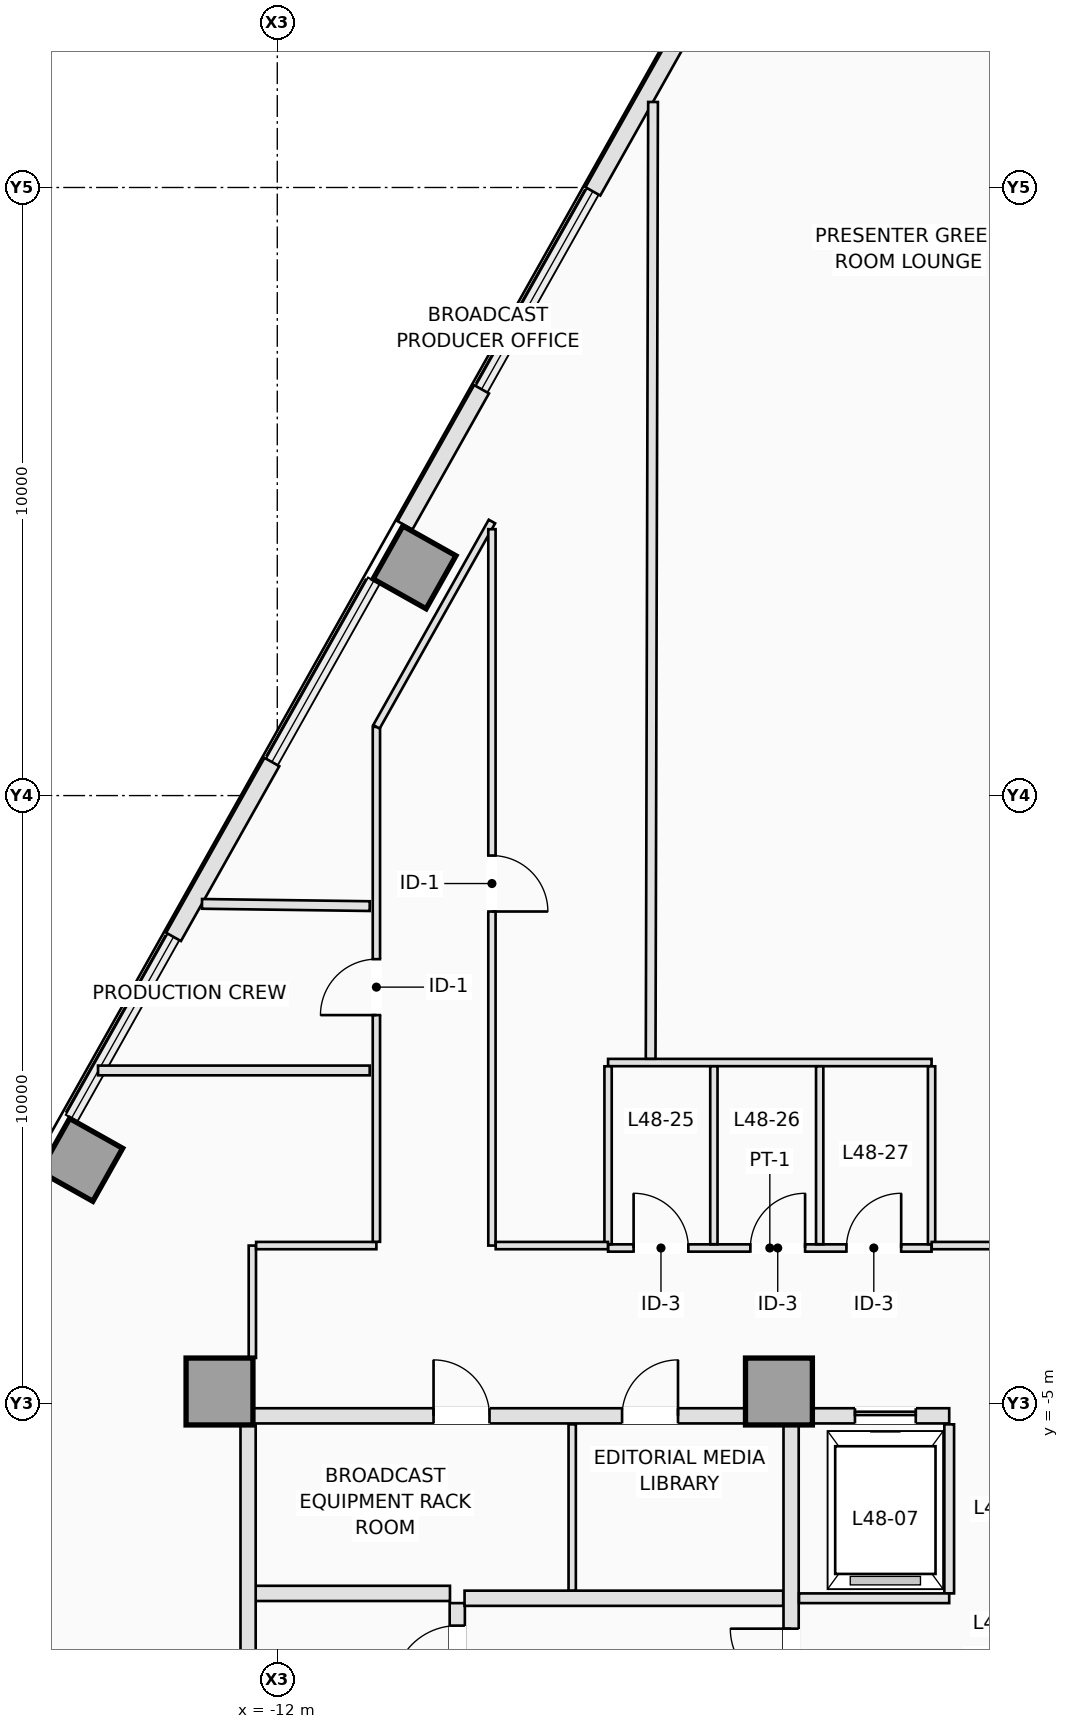
"""IFC4 building model, lengths in metres.
Left out: names, types, materials, properties, quantities, classifications, styles, units other than length and angle.
Written with IfcOpenShell. Run it as: python <this file> out.ifc"""

import sys

from ifc_helpers import new_model, si_unit, direction, frame, frame_2d, origin, origin_2d, place, context, subcontext, project, spatial, rectangle, extrude, element, fill, save


model = new_model("IFC4")
c1 = context("Model", 3, precision=1e-05, world=origin(), true_north=direction((0.0, 1.0)))
c2 = subcontext(c1, "Body", "Model", "MODEL_VIEW")
j1 = project(units=[si_unit("LENGTHUNIT", "METRE"), si_unit("PLANEANGLEUNIT", "RADIAN")], contexts=[c1])
p1 = place(None, origin())
s1 = spatial("IfcSite", under=j1, at=p1, CompositionType="ELEMENT")
p2 = place(p1, origin())
s2 = spatial("IfcBuilding", under=s1, at=p2, CompositionType="ELEMENT")
p3 = place(p2, frame((0.0, 0.0, 175.5)))
s3 = spatial("IfcBuildingStorey", under=s2, at=p3, CompositionType="ELEMENT", Elevation=175.5)
for number, where, z_axis, x_axis in (
    (1, (-12.95, -4.8, 0.0), (0.0, 0.0, 1.0), (1.0, 0.0, 0.0)),
    (2, (-3.75, -4.8, 0.0), (0.0, 0.0, 1.0), (1.0, 0.0, 0.0)),
):
    element("IfcColumn", number, at=place(p3, frame(where, z_axis=z_axis, x_axis=x_axis)), inside=s3, PredefinedType="COLUMN", context=c2, shape_type="SweptSolid", body=[
        extrude(rectangle(XDim=1.1, YDim=1.1, at=origin_2d()), origin(), (0.0, 0.0, 1.0), 3.5),
    ])
for number, where, z_axis, x_axis in (
    (3, (-9.743, 8.753, 0.0), (0.0, 0.0, 1.0), (-0.872, 0.49, 0.0)),
    (4, (-15.224, -0.991, 0.0), (0.0, 0.0, 1.0), (-0.872, 0.49, 0.0)),
):
    element("IfcColumn", number, at=place(p3, frame(where, z_axis=z_axis, x_axis=x_axis)), inside=s3, PredefinedType="COLUMN", context=c2, shape_type="SweptSolid", body=[
        extrude(rectangle(XDim=1.0, YDim=1.0, at=origin_2d()), origin(), (0.0, 0.0, 1.0), 3.5),
    ])
p4 = place(p3, frame((-9.9, 9.444, 0.0), z_axis=(0.0, 0.0, 1.0), x_axis=(0.490301864627, 0.871552684319, 0.0)))
e5 = element("IfcWall", 5, at=p4, inside=s3, PredefinedType="STANDARD", context=c2, shape_type="SweptSolid", body=[
    extrude(rectangle(XDim=2.568, YDim=0.28, at=frame_2d((1.284, 0.0))), origin(), (0.0, 0.0, 1.0), 3.14),
])
p5 = place(p3, frame((-6.81, 14.936, 0.0), z_axis=(0.0, 0.0, 1.0), x_axis=(0.490250201787, 0.871581745821, 0.0)))
e6 = element("IfcWall", 6, at=p5, inside=s3, PredefinedType="STANDARD", context=c2, shape_type="SweptSolid", body=[
    extrude(rectangle(XDim=4.201, YDim=0.28, at=frame_2d((2.1, 0.0))), origin(), (0.0, 0.0, 1.0), 3.14),
])
p6 = place(p3, frame((-13.706, 2.677, 0.0), z_axis=(0.0, 0.0, 1.0), x_axis=(0.490285834707, 0.871561701938, 0.0)))
e7 = element("IfcWall", 7, at=p6, inside=s3, PredefinedType="STANDARD", context=c2, shape_type="SweptSolid", body=[
    extrude(rectangle(XDim=3.299, YDim=0.28, at=frame_2d((1.649, 0.0))), origin(), (0.0, 0.0, 1.0), 3.14),
])
p7 = place(p3, frame((-9.04, -10.18, 0.0), z_axis=(0.0, 0.0, 1.0), x_axis=(0.0, 1.0, 0.0)))
e8 = element("IfcWall", 8, at=p7, inside=s3, PredefinedType="PARTITIONING", context=c2, shape_type="SweptSolid", body=[
    extrude(rectangle(XDim=1.9, YDim=0.25, at=frame_2d((0.95, 0.0))), origin(), (0.0, 0.0, 1.0), 3.14),
])
p8 = place(p7, frame((0.48, 0.0, 0.0)))
e9 = element("IfcOpeningElement", 9, at=p8, cuts=e8, PredefinedType="OPENING", context=c2, shape_type="SweptSolid", body=[
    extrude(rectangle(XDim=1.05, YDim=2.15, at=frame_2d((0.525, 1.075))), frame((0.0, 0.135, 0.0), z_axis=(0.0, -1.0, 0.0), x_axis=(1.0, 0.0, 0.0)), (0.0, 0.0, 1.0), 0.27),
])
p9 = place(p3, frame((-12.38, -8.12, 0.0), z_axis=(0.0, 0.0, 1.0), x_axis=(1.0, 0.0, 0.0)))
e10 = element("IfcWall", 10, at=p9, inside=s3, PredefinedType="PARTITIONING", context=c2, shape_type="SweptSolid", body=[
    extrude(rectangle(XDim=3.22, YDim=0.25, at=frame_2d((1.61, 0.0))), origin(), (0.0, 0.0, 1.0), 3.14),
])
p10 = place(p3, frame((-12.48, -10.18, 0.0), z_axis=(0.0, 0.0, 1.0), x_axis=(0.0, 1.0, 0.0)))
e11 = element("IfcWall", 11, at=p10, inside=s3, PredefinedType="PARTITIONING", context=c2, shape_type="SweptSolid", body=[
    extrude(rectangle(XDim=4.828, YDim=0.25, at=frame_2d((2.414, 0.0))), origin(), (0.0, 0.0, 1.0), 3.14),
])
p11 = place(p3, frame((-8.92, -8.2, 0.0), z_axis=(0.0, 0.0, 1.0), x_axis=(1.0, 0.0, 0.0)))
e12 = element("IfcWall", 12, at=p11, inside=s3, PredefinedType="PARTITIONING", context=c2, shape_type="SweptSolid", body=[
    extrude(rectangle(XDim=5.24, YDim=0.25, at=frame_2d((2.62, 0.0))), origin(), (0.0, 0.0, 1.0), 3.14),
])
p12 = place(p3, frame((-3.55, -15.798, 0.0), z_axis=(0.0, 0.0, 1.0), x_axis=(0.0, 1.0, 0.0)))
e13 = element("IfcWall", 13, at=p12, inside=s3, PredefinedType="PARTITIONING", context=c2, shape_type="SweptSolid", body=[
    extrude(rectangle(XDim=10.446, YDim=0.25, at=frame_2d((5.223, 0.0))), origin(), (0.0, 0.0, 1.0), 3.14),
])
p13 = place(p12, frame((6.098, 0.0, 0.0)))
e14 = element("IfcOpeningElement", 14, at=p13, cuts=e13, PredefinedType="OPENING", context=c2, shape_type="SweptSolid", body=[
    extrude(rectangle(XDim=1.0, YDim=2.15, at=frame_2d((0.5, 1.075))), frame((0.0, 0.135, 0.0), z_axis=(0.0, -1.0, 0.0), x_axis=(1.0, 0.0, 0.0)), (0.0, 0.0, 1.0), 0.27),
])
p14 = place(p3, frame((-12.398, -5.2, 0.0), z_axis=(0.0, 0.0, 1.0), x_axis=(1.0, 0.0, 0.0)))
e15 = element("IfcWall", 15, at=p14, inside=s3, PredefinedType="PARTITIONING", context=c2, shape_type="SweptSolid", body=[
    extrude(rectangle(XDim=8.096, YDim=0.25, at=frame_2d((4.048, 0.0))), origin(), (0.0, 0.0, 1.0), 3.14),
])
p15 = place(p14, frame((2.968, 0.0, 0.0)))
e16 = element("IfcOpeningElement", 16, at=p15, cuts=e15, PredefinedType="OPENING", context=c2, shape_type="SweptSolid", body=[
    extrude(rectangle(XDim=0.92, YDim=2.12, at=frame_2d((0.46, 1.06))), frame((0.0, 0.135, 0.0), z_axis=(0.0, -1.0, 0.0), x_axis=(1.0, 0.0, 0.0)), (0.0, 0.0, 1.0), 0.27),
])
p16 = place(p14, frame((6.068, 0.0, 0.0)))
e17 = element("IfcOpeningElement", 17, at=p16, cuts=e15, PredefinedType="OPENING", context=c2, shape_type="SweptSolid", body=[
    extrude(rectangle(XDim=0.92, YDim=2.12, at=frame_2d((0.46, 1.06))), frame((0.0, 0.135, 0.0), z_axis=(0.0, -1.0, 0.0), x_axis=(1.0, 0.0, 0.0)), (0.0, 0.0, 1.0), 0.27),
])
p17 = place(p3, frame((-3.198, -5.2, 0.0), z_axis=(0.0, 0.0, 1.0), x_axis=(1.0, 0.0, 0.0)))
e18 = element("IfcWall", 18, at=p17, inside=s3, PredefinedType="PARTITIONING", context=c2, shape_type="SweptSolid", body=[
    extrude(rectangle(XDim=2.248, YDim=0.25, at=frame_2d((1.124, 0.0))), origin(), (0.0, 0.0, 1.0), 3.14),
])
p18 = place(p17, frame((0.698, 0.0, 0.0)))
e19 = element("IfcOpeningElement", 19, at=p18, cuts=e18, PredefinedType="OPENING", context=c2, shape_type="SweptSolid", body=[
    extrude(rectangle(XDim=1.0, YDim=2.15, at=frame_2d((0.5, 1.075))), frame((0.0, 0.135, 0.0), z_axis=(0.0, -1.0, 0.0), x_axis=(1.0, 0.0, 0.0)), (0.0, 0.0, 1.0), 0.27),
])
p19 = place(p3, frame((-7.15, -8.073, 0.0), z_axis=(0.0, 0.0, 1.0), x_axis=(0.0, 1.0, 0.0)))
e20 = element("IfcWall", 20, at=p19, inside=s3, PredefinedType="PARTITIONING", context=c2, shape_type="SweptSolid", body=[
    extrude(rectangle(XDim=2.733, YDim=0.12, at=frame_2d((1.366, 0.0))), origin(), (0.0, 0.0, 1.0), 3.14),
])
p20 = place(p3, frame((-0.95, -8.12, 0.0), z_axis=(0.0, 0.0, 1.0), x_axis=(0.0, 1.0, 0.0)))
e21 = element("IfcWall", 21, at=p20, inside=s3, PredefinedType="PARTITIONING", context=c2, shape_type="SweptSolid", body=[
    extrude(rectangle(XDim=2.78, YDim=0.16, at=frame_2d((1.39, 0.0))), origin(), (0.0, 0.0, 1.0), 3.14),
])
p21 = place(p3, frame((-3.42, -8.2, 0.0), z_axis=(0.0, 0.0, 1.0), x_axis=(1.0, 0.0, 0.0)))
e22 = element("IfcWall", 22, at=p21, inside=s3, PredefinedType="PARTITIONING", context=c2, shape_type="SweptSolid", body=[
    extrude(rectangle(XDim=2.47, YDim=0.16, at=frame_2d((1.235, 0.0))), origin(), (0.0, 0.0, 1.0), 3.14),
])
p22 = place(p3, frame((-6.56, -2.44, 0.0), z_axis=(0.0, 0.0, 1.0), x_axis=(1.0, 0.0, 0.0)))
e23 = element("IfcWall", 23, at=p22, inside=s3, PredefinedType="PARTITIONING", context=c2, shape_type="SweptSolid", body=[
    extrude(rectangle(XDim=5.32, YDim=0.12, at=frame_2d((2.66, 0.0))), origin(), (0.0, 0.0, 1.0), 2.781),
])
p23 = place(p22, frame((0.42, 0.0, 0.0)))
e24 = element("IfcOpeningElement", 24, at=p23, cuts=e23, PredefinedType="OPENING", context=c2, shape_type="SweptSolid", body=[
    extrude(rectangle(XDim=0.9, YDim=2.12, at=frame_2d((0.45, 1.06))), frame((0.0, 0.07, 0.0), z_axis=(0.0, -1.0, 0.0), x_axis=(1.0, 0.0, 0.0)), (0.0, 0.0, 1.0), 0.14),
])
p24 = place(p22, frame((2.34, 0.0, 0.0)))
e25 = element("IfcOpeningElement", 25, at=p24, cuts=e23, PredefinedType="OPENING", context=c2, shape_type="SweptSolid", body=[
    extrude(rectangle(XDim=0.9, YDim=2.12, at=frame_2d((0.45, 1.06))), frame((0.0, 0.07, 0.0), z_axis=(0.0, -1.0, 0.0), x_axis=(1.0, 0.0, 0.0)), (0.0, 0.0, 1.0), 0.14),
])
p25 = place(p22, frame((3.92, 0.0, 0.0)))
e26 = element("IfcOpeningElement", 26, at=p25, cuts=e23, PredefinedType="OPENING", context=c2, shape_type="SweptSolid", body=[
    extrude(rectangle(XDim=0.9, YDim=2.12, at=frame_2d((0.45, 1.06))), frame((0.0, 0.07, 0.0), z_axis=(0.0, -1.0, 0.0), x_axis=(1.0, 0.0, 0.0)), (0.0, 0.0, 1.0), 0.14),
])
p26 = place(p3, frame((-6.56, 0.61, 0.0), z_axis=(0.0, 0.0, 1.0), x_axis=(1.0, 0.0, 0.0)))
e27 = element("IfcWall", 27, at=p26, inside=s3, PredefinedType="PARTITIONING", context=c2, shape_type="SweptSolid", body=[
    extrude(rectangle(XDim=5.32, YDim=0.12, at=frame_2d((2.66, 0.0))), origin(), (0.0, 0.0, 1.0), 3.14),
])
for number, where, z_axis, x_axis in (
    (28, (-6.56, -2.378, 0.0), (0.0, 0.0, 1.0), (0.0, 1.0, 0.0)),
    (29, (-4.82, -2.378, 0.0), (0.0, 0.0, 1.0), (0.0, 1.0, 0.0)),
    (30, (-3.08, -2.378, 0.0), (0.0, 0.0, 1.0), (0.0, 1.0, 0.0)),
    (31, (-1.24, -2.378, 0.0), (0.0, 0.0, 1.0), (0.0, 1.0, 0.0)),
):
    element("IfcWall", number, at=place(p3, frame(where, z_axis=z_axis, x_axis=x_axis)), inside=s3, PredefinedType="PARTITIONING", context=c2, shape_type="SweptSolid", body=[
        extrude(rectangle(XDim=2.926, YDim=0.12, at=frame_2d((1.463, 0.0))), origin(), (0.0, 0.0, 1.0), 3.14),
    ])
p27 = place(p3, frame((-12.41, -4.248, 0.0), z_axis=(0.0, 0.0, 1.0), x_axis=(0.0, 1.0, 0.0)))
e32 = element("IfcWall", 32, at=p27, inside=s3, PredefinedType="PARTITIONING", context=c2, shape_type="SweptSolid", body=[
    extrude(rectangle(XDim=1.848, YDim=0.12, at=frame_2d((0.924, 0.0))), origin(), (0.0, 0.0, 1.0), 3.14),
])
p28 = place(p3, frame((-12.348, -2.4, 0.0), z_axis=(0.0, 0.0, 1.0), x_axis=(1.0, 0.0, 0.0)))
e33 = element("IfcWall", 33, at=p28, inside=s3, PredefinedType="PARTITIONING", context=c2, shape_type="SweptSolid", body=[
    extrude(rectangle(XDim=1.978, YDim=0.12, at=frame_2d((0.989, 0.0))), origin(), (0.0, 0.0, 1.0), 3.14),
])
p29 = place(p3, frame((-10.37, -2.338, 0.0), z_axis=(0.0, 0.0, 1.0), x_axis=(0.0, 1.0, 0.0)))
e34 = element("IfcWall", 34, at=p29, inside=s3, PredefinedType="PARTITIONING", context=c2, shape_type="SweptSolid", body=[
    extrude(rectangle(XDim=8.467, YDim=0.12, at=frame_2d((4.233, 0.0))), origin(), (0.0, 0.0, 1.0), 3.14),
])
p30 = place(p29, frame((3.728, 0.0, 0.0)))
e35 = element("IfcOpeningElement", 35, at=p30, cuts=e34, PredefinedType="OPENING", context=c2, shape_type="SweptSolid", body=[
    extrude(rectangle(XDim=0.92, YDim=2.12, at=frame_2d((0.46, 1.06))), frame((0.0, 0.07, 0.0), z_axis=(0.0, -1.0, 0.0), x_axis=(1.0, 0.0, 0.0)), (0.0, 0.0, 1.0), 0.14),
])
p31 = place(p3, frame((-10.369, 6.131, 0.0), z_axis=(0.0, 0.0, 1.0), x_axis=(0.49024926945, 0.871582270244, 0.0)))
e36 = element("IfcWall", 36, at=p31, inside=s3, PredefinedType="PARTITIONING", context=c2, shape_type="SweptSolid", body=[
    extrude(rectangle(XDim=3.873, YDim=0.12, at=frame_2d((1.937, 0.0))), origin(), (0.0, 0.0, 1.0), 3.14),
])
p32 = place(p3, frame((-8.47, 9.381, 0.0), z_axis=(0.0, 0.0, 1.0), x_axis=(0.0, -1.0, 0.0)))
e37 = element("IfcWall", 37, at=p32, inside=s3, PredefinedType="PARTITIONING", context=c2, shape_type="SweptSolid", body=[
    extrude(rectangle(XDim=11.781, YDim=0.12, at=frame_2d((5.89, 0.0))), origin(), (0.0, 0.0, 1.0), 3.14),
])
p33 = place(p32, frame((5.367, 0.0, 0.0)))
e38 = element("IfcOpeningElement", 38, at=p33, cuts=e37, PredefinedType="OPENING", context=c2, shape_type="SweptSolid", body=[
    extrude(rectangle(XDim=0.92, YDim=2.12, at=frame_2d((0.46, 1.06))), frame((0.0, 0.07, 0.0), z_axis=(0.0, -1.0, 0.0), x_axis=(1.0, 0.0, 0.0)), (0.0, 0.0, 1.0), 0.14),
])
p34 = place(p3, frame((-8.408, -2.4, 0.0), z_axis=(0.0, 0.0, 1.0), x_axis=(1.0, 0.0, 0.0)))
e39 = element("IfcWall", 39, at=p34, inside=s3, PredefinedType="PARTITIONING", context=c2, shape_type="SweptSolid", body=[
    extrude(rectangle(XDim=1.846, YDim=0.12, at=frame_2d((0.923, 0.0))), origin(), (0.0, 0.0, 1.0), 3.14),
])
p35 = place(p3, frame((-1.238, -2.4, 0.0), z_axis=(0.0, 0.0, 1.0), x_axis=(1.0, 0.0, 0.0)))
e40 = element("IfcWall", 40, at=p35, inside=s3, PredefinedType="PARTITIONING", context=c2, shape_type="SweptSolid", body=[
    extrude(rectangle(XDim=9.768, YDim=0.12, at=frame_2d((4.884, 0.0))), origin(), (0.0, 0.0, 1.0), 2.781),
])
p36 = place(p35, frame((1.438, 0.0, 0.0)))
e41 = element("IfcOpeningElement", 41, at=p36, cuts=e40, PredefinedType="OPENING", context=c2, shape_type="SweptSolid", body=[
    extrude(rectangle(XDim=0.92, YDim=2.12, at=frame_2d((0.46, 1.06))), frame((0.0, 0.07, 0.0), z_axis=(0.0, -1.0, 0.0), x_axis=(1.0, 0.0, 0.0)), (0.0, 0.0, 1.0), 0.14),
])
p37 = place(p35, frame((4.568, 0.0, 0.0)))
e42 = element("IfcOpeningElement", 42, at=p37, cuts=e40, PredefinedType="OPENING", context=c2, shape_type="SweptSolid", body=[
    extrude(rectangle(XDim=0.92, YDim=2.12, at=frame_2d((0.46, 1.06))), frame((0.0, 0.07, 0.0), z_axis=(0.0, -1.0, 0.0), x_axis=(1.0, 0.0, 0.0)), (0.0, 0.0, 1.0), 0.14),
])
p38 = place(p35, frame((6.948, 0.0, 0.0)))
e43 = element("IfcOpeningElement", 43, at=p38, cuts=e40, PredefinedType="OPENING", context=c2, shape_type="SweptSolid", body=[
    extrude(rectangle(XDim=0.92, YDim=2.12, at=frame_2d((0.46, 1.06))), frame((0.0, 0.07, 0.0), z_axis=(0.0, -1.0, 0.0), x_axis=(1.0, 0.0, 0.0)), (0.0, 0.0, 1.0), 0.14),
])
p39 = place(p3, frame((-5.86, 0.672, 0.0), z_axis=(0.0, 0.0, 1.0), x_axis=(0.002513685481, 0.999996840688, 0.0)))
e44 = element("IfcWall", 44, at=p39, inside=s3, PredefinedType="PARTITIONING", context=c2, shape_type="SweptSolid", body=[
    extrude(rectangle(XDim=15.734, YDim=0.16, at=frame_2d((7.867, 0.0))), origin(), (0.0, 0.0, 1.0), 3.14),
])
p40 = place(p3, frame((-10.48, 3.182, 0.0), z_axis=(0.0, 0.0, 1.0), x_axis=(-0.999909495127, 0.013453681797, 0.0)))
e45 = element("IfcWall", 45, at=p40, inside=s3, PredefinedType="PARTITIONING", context=c2, shape_type="SweptSolid", body=[
    extrude(rectangle(XDim=2.758, YDim=0.16, at=frame_2d((1.379, 0.0))), origin(), (0.0, 0.0, 1.0), 3.14),
])
p41 = place(p3, frame((-10.48, 0.48, 0.0), z_axis=(0.0, 0.0, 1.0), x_axis=(-1.0, 0.0, 0.0)))
e46 = element("IfcWall", 46, at=p41, inside=s3, PredefinedType="PARTITIONING", context=c2, shape_type="SweptSolid", body=[
    extrude(rectangle(XDim=4.468, YDim=0.16, at=frame_2d((2.234, 0.0))), origin(), (0.0, 0.0, 1.0), 3.14),
])
p42 = place(p18, origin())
e47 = element("IfcDoor", 47, at=p42, inside=s3, OperationType="SLIDING_TO_LEFT", PredefinedType="DOOR", context=c2, shape_type="SweptSolid", body=[
    extrude(rectangle(XDim=1.0, YDim=2.15, at=frame_2d((0.5, 1.075))), frame((0.0, 0.025, 0.0), z_axis=(0.0, -1.0, 0.0), x_axis=(1.0, 0.0, 0.0)), (0.0, 0.0, 1.0), 0.05),
])
fill(e19, e47)
p43 = place(p8, origin())
e48 = element("IfcDoor", 48, at=p43, inside=s3, OperationType="SINGLE_SWING_LEFT", PredefinedType="DOOR", context=c2, shape_type="SweptSolid", body=[
    extrude(rectangle(XDim=1.05, YDim=2.15, at=frame_2d((0.525, 1.075))), frame((0.0, 0.025, 0.0), z_axis=(0.0, -1.0, 0.0), x_axis=(1.0, 0.0, 0.0)), (0.0, 0.0, 1.0), 0.05),
])
fill(e9, e48)
p44 = place(p13, origin())
e49 = element("IfcDoor", 49, at=p44, inside=s3, OperationType="SINGLE_SWING_RIGHT", PredefinedType="DOOR", context=c2, shape_type="SweptSolid", body=[
    extrude(rectangle(XDim=1.0, YDim=2.15, at=frame_2d((0.5, 1.075))), frame((0.0, 0.025, 0.0), z_axis=(0.0, -1.0, 0.0), x_axis=(1.0, 0.0, 0.0)), (0.0, 0.0, 1.0), 0.05),
])
fill(e14, e49)
p45 = place(p15, origin())
e50 = element("IfcDoor", 50, at=p45, inside=s3, OperationType="SINGLE_SWING_LEFT", PredefinedType="DOOR", context=c2, shape_type="SweptSolid", body=[
    extrude(rectangle(XDim=0.92, YDim=2.12, at=frame_2d((0.46, 1.06))), frame((0.0, 0.025, 0.0), z_axis=(0.0, -1.0, 0.0), x_axis=(1.0, 0.0, 0.0)), (0.0, 0.0, 1.0), 0.05),
])
fill(e16, e50)
p46 = place(p16, origin())
e51 = element("IfcDoor", 51, at=p46, inside=s3, OperationType="SINGLE_SWING_RIGHT", PredefinedType="DOOR", context=c2, shape_type="SweptSolid", body=[
    extrude(rectangle(XDim=0.92, YDim=2.12, at=frame_2d((0.46, 1.06))), frame((0.0, 0.025, 0.0), z_axis=(0.0, -1.0, 0.0), x_axis=(1.0, 0.0, 0.0)), (0.0, 0.0, 1.0), 0.05),
])
fill(e17, e51)
p47 = place(p23, origin())
e52 = element("IfcDoor", 52, at=p47, inside=s3, OperationType="SINGLE_SWING_LEFT", PredefinedType="DOOR", context=c2, shape_type="SweptSolid", body=[
    extrude(rectangle(XDim=0.9, YDim=2.12, at=frame_2d((0.45, 1.06))), frame((0.0, 0.025, 0.0), z_axis=(0.0, -1.0, 0.0), x_axis=(1.0, 0.0, 0.0)), (0.0, 0.0, 1.0), 0.05),
])
fill(e24, e52)
p48 = place(p24, origin())
e53 = element("IfcDoor", 53, at=p48, inside=s3, OperationType="SINGLE_SWING_RIGHT", PredefinedType="DOOR", context=c2, shape_type="SweptSolid", body=[
    extrude(rectangle(XDim=0.9, YDim=2.12, at=frame_2d((0.45, 1.06))), frame((0.0, 0.025, 0.0), z_axis=(0.0, -1.0, 0.0), x_axis=(1.0, 0.0, 0.0)), (0.0, 0.0, 1.0), 0.05),
])
fill(e25, e53)
p49 = place(p25, origin())
e54 = element("IfcDoor", 54, at=p49, inside=s3, OperationType="SINGLE_SWING_RIGHT", PredefinedType="DOOR", context=c2, shape_type="SweptSolid", body=[
    extrude(rectangle(XDim=0.9, YDim=2.12, at=frame_2d((0.45, 1.06))), frame((0.0, 0.025, 0.0), z_axis=(0.0, -1.0, 0.0), x_axis=(1.0, 0.0, 0.0)), (0.0, 0.0, 1.0), 0.05),
])
fill(e26, e54)
p50 = place(p33, origin())
e55 = element("IfcDoor", 55, at=p50, inside=s3, OperationType="SINGLE_SWING_RIGHT", PredefinedType="DOOR", context=c2, shape_type="SweptSolid", body=[
    extrude(rectangle(XDim=0.92, YDim=2.12, at=frame_2d((0.46, 1.06))), frame((0.0, 0.025, 0.0), z_axis=(0.0, -1.0, 0.0), x_axis=(1.0, 0.0, 0.0)), (0.0, 0.0, 1.0), 0.05),
])
fill(e38, e55)
p51 = place(p30, origin())
e56 = element("IfcDoor", 56, at=p51, inside=s3, OperationType="SINGLE_SWING_LEFT", PredefinedType="DOOR", context=c2, shape_type="SweptSolid", body=[
    extrude(rectangle(XDim=0.92, YDim=2.12, at=frame_2d((0.46, 1.06))), frame((0.0, 0.025, 0.0), z_axis=(0.0, -1.0, 0.0), x_axis=(1.0, 0.0, 0.0)), (0.0, 0.0, 1.0), 0.05),
])
fill(e35, e56)
save(model, sys.argv[1])
